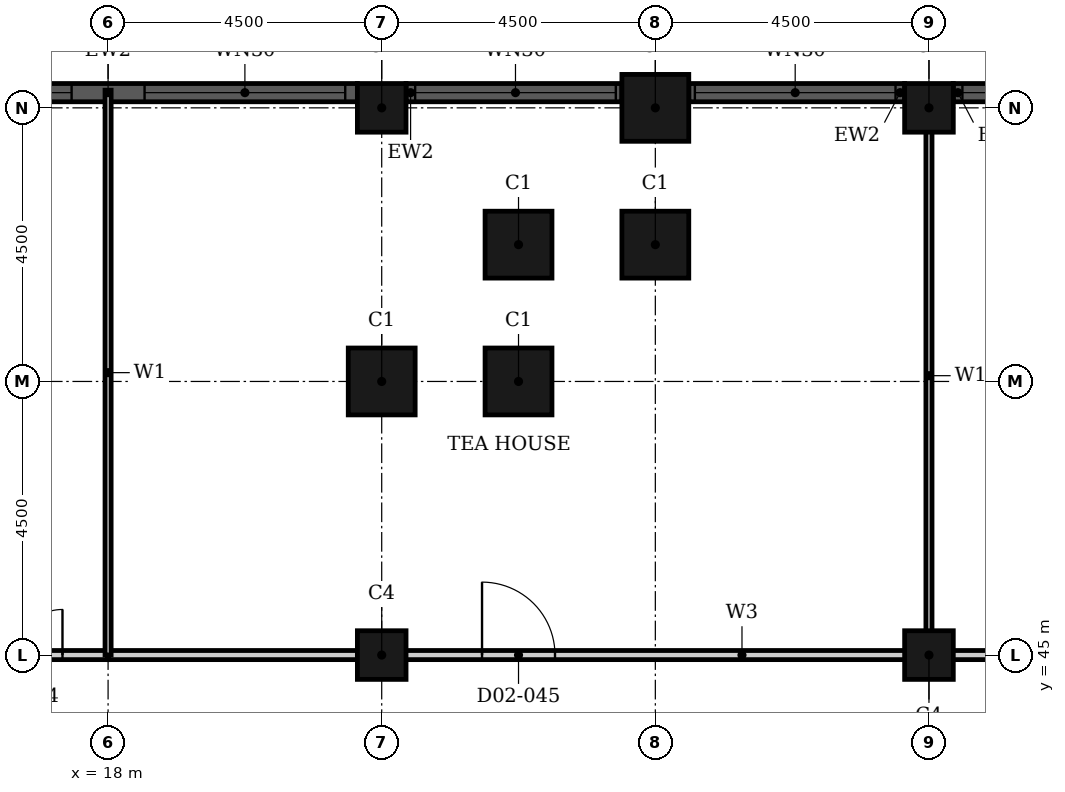
"""IFC4 building model, lengths in metres.
Left out: names, types, materials, properties, quantities, classifications, styles, units other than length and angle.
Written with IfcOpenShell. Run it as: python <this file> out.ifc"""

import sys

from ifc_helpers import new_model, si_unit, direction, frame, frame_2d, origin, origin_2d, place, context, subcontext, project, spatial, rectangle, hollow_rectangle, extrude, element, fill, save


model = new_model("IFC4")
c1 = context("Model", 3, precision=1e-05, world=origin(), true_north=direction((0.0, 1.0)))
c2 = subcontext(c1, "Body", "Model", "MODEL_VIEW")
j1 = project(units=[si_unit("LENGTHUNIT", "METRE"), si_unit("PLANEANGLEUNIT", "RADIAN")], contexts=[c1])
p1 = place(None, origin())
s1 = spatial("IfcSite", under=j1, at=p1, CompositionType="ELEMENT")
p2 = place(p1, origin())
s2 = spatial("IfcBuilding", under=s1, at=p2, CompositionType="ELEMENT")
p3 = place(p2, frame((0.0, 0.0, 12.0)))
s3 = spatial("IfcBuildingStorey", under=s2, at=p3, CompositionType="ELEMENT", Elevation=12.0)
for number, where, z_axis, x_axis in (
    (1, (27.0, 54.0, 0.0), (0.0, 0.0, 1.0), (1.0, 0.0, 0.0)),
    (2, (27.0, 51.75, 0.0), (0.0, 0.0, 1.0), (1.0, 0.0, 0.0)),
    (3, (24.75, 51.75, 0.0), (0.0, 0.0, 1.0), (1.0, 0.0, 0.0)),
    (4, (24.75, 49.5, 0.0), (0.0, 0.0, 1.0), (1.0, 0.0, 0.0)),
    (5, (22.5, 49.5, 0.0), (0.0, 0.0, 1.0), (1.0, 0.0, 0.0)),
):
    element("IfcColumn", number, at=place(p3, frame(where, z_axis=z_axis, x_axis=x_axis)), inside=s3, PredefinedType="COLUMN", context=c2, shape_type="SweptSolid", body=[
        extrude(hollow_rectangle(XDim=1.1, YDim=1.1, WallThickness=0.036, at=origin_2d()), origin(), (0.0, 0.0, 1.0), 5.4),
    ])
for number, where, z_axis, x_axis in (
    (6, (22.5, 54.0, 0.0), (0.0, 0.0, 1.0), (1.0, 0.0, 0.0)),
    (7, (31.5, 54.0, 0.0), (0.0, 0.0, 1.0), (1.0, 0.0, 0.0)),
    (8, (22.5, 45.0, 0.0), (0.0, 0.0, 1.0), (1.0, 0.0, 0.0)),
    (9, (31.5, 45.0, 0.0), (0.0, 0.0, 1.0), (1.0, 0.0, 0.0)),
):
    element("IfcColumn", number, at=place(p3, frame(where, z_axis=z_axis, x_axis=x_axis)), inside=s3, PredefinedType="COLUMN", context=c2, shape_type="SweptSolid", body=[
        extrude(hollow_rectangle(XDim=0.8, YDim=0.8, WallThickness=0.025, at=origin_2d()), origin(), (0.0, 0.0, 1.0), 5.4),
    ])
p4 = place(p3, frame((35.45, 54.25, 0.0), z_axis=(0.0, 0.0, 1.0), x_axis=(-1.0, 0.0, 0.0)))
e10 = element("IfcWall", 10, at=p4, inside=s3, PredefinedType="SOLIDWALL", context=c2, shape_type="SweptSolid", body=[
    extrude(rectangle(XDim=3.55, YDim=0.3, at=frame_2d((1.775, 0.0))), origin(), (0.0, 0.0, 1.0), 5.4),
])
p5 = place(p4, frame((0.1, 0.0, 0.9)))
e11 = element("IfcOpeningElement", 11, at=p5, cuts=e10, PredefinedType="OPENING", context=c2, shape_type="SweptSolid", body=[
    extrude(rectangle(XDim=3.3, YDim=3.5, at=frame_2d((1.65, 1.75))), frame((0.0, 0.16, 0.0), z_axis=(0.0, -1.0, 0.0), x_axis=(1.0, 0.0, 0.0)), (0.0, 0.0, 1.0), 0.32),
])
p6 = place(p3, frame((31.1, 54.25, 0.0), z_axis=(0.0, 0.0, 1.0), x_axis=(-1.0, 0.0, 0.0)))
e12 = element("IfcWall", 12, at=p6, inside=s3, PredefinedType="SOLIDWALL", context=c2, shape_type="SweptSolid", body=[
    extrude(rectangle(XDim=3.55, YDim=0.3, at=frame_2d((1.775, 0.0))), origin(), (0.0, 0.0, 1.0), 5.4),
])
p7 = place(p6, frame((0.15, 0.0, 0.9)))
e13 = element("IfcOpeningElement", 13, at=p7, cuts=e12, PredefinedType="OPENING", context=c2, shape_type="SweptSolid", body=[
    extrude(rectangle(XDim=3.3, YDim=3.5, at=frame_2d((1.65, 1.75))), frame((0.0, 0.16, 0.0), z_axis=(0.0, -1.0, 0.0), x_axis=(1.0, 0.0, 0.0)), (0.0, 0.0, 1.0), 0.32),
])
p8 = place(p3, frame((26.45, 54.25, 0.0), z_axis=(0.0, 0.0, 1.0), x_axis=(-1.0, 0.0, 0.0)))
e14 = element("IfcWall", 14, at=p8, inside=s3, PredefinedType="SOLIDWALL", context=c2, shape_type="SweptSolid", body=[
    extrude(rectangle(XDim=3.55, YDim=0.3, at=frame_2d((1.775, 0.0))), origin(), (0.0, 0.0, 1.0), 5.4),
])
p9 = place(p8, frame((0.1, 0.0, 0.9)))
e15 = element("IfcOpeningElement", 15, at=p9, cuts=e14, PredefinedType="OPENING", context=c2, shape_type="SweptSolid", body=[
    extrude(rectangle(XDim=3.3, YDim=3.5, at=frame_2d((1.65, 1.75))), frame((0.0, 0.16, 0.0), z_axis=(0.0, -1.0, 0.0), x_axis=(1.0, 0.0, 0.0)), (0.0, 0.0, 1.0), 0.32),
])
p10 = place(p3, frame((22.1, 54.25, 0.0), z_axis=(0.0, 0.0, 1.0), x_axis=(-1.0, 0.0, 0.0)))
e16 = element("IfcWall", 16, at=p10, inside=s3, PredefinedType="SOLIDWALL", context=c2, shape_type="SweptSolid", body=[
    extrude(rectangle(XDim=8.2, YDim=0.3, at=frame_2d((4.1, 0.0))), origin(), (0.0, 0.0, 1.0), 5.4),
])
p11 = place(p10, frame((0.2, 0.0, 0.9)))
e17 = element("IfcOpeningElement", 17, at=p11, cuts=e16, PredefinedType="OPENING", context=c2, shape_type="SweptSolid", body=[
    extrude(rectangle(XDim=3.3, YDim=3.5, at=frame_2d((1.65, 1.75))), frame((0.0, 0.16, 0.0), z_axis=(0.0, -1.0, 0.0), x_axis=(1.0, 0.0, 0.0)), (0.0, 0.0, 1.0), 0.32),
])
p12 = place(p10, frame((4.7, 0.0, 0.9)))
e18 = element("IfcOpeningElement", 18, at=p12, cuts=e16, PredefinedType="OPENING", context=c2, shape_type="SweptSolid", body=[
    extrude(rectangle(XDim=3.3, YDim=3.5, at=frame_2d((1.65, 1.75))), frame((0.0, 0.16, 0.0), z_axis=(0.0, -1.0, 0.0), x_axis=(1.0, 0.0, 0.0)), (0.0, 0.0, 1.0), 0.32),
])
p13 = place(p3, frame((15.0, 45.0, 0.0), z_axis=(0.0, 0.0, 1.0), x_axis=(1.0, 0.0, 0.0)))
e19 = element("IfcWall", 19, at=p13, inside=s3, PredefinedType="PARTITIONING", context=c2, shape_type="SweptSolid", body=[
    extrude(rectangle(XDim=3.0, YDim=0.15, at=frame_2d((1.5, 0.0))), origin(), (0.0, 0.0, 1.0), 5.05),
])
p14 = place(p13, frame((0.75, 0.0, 0.0)))
e20 = element("IfcOpeningElement", 20, at=p14, cuts=e19, PredefinedType="OPENING", context=c2, shape_type="SweptSolid", body=[
    extrude(rectangle(XDim=1.5, YDim=2.4, at=frame_2d((0.75, 1.2))), frame((0.0, 0.085, 0.0), z_axis=(0.0, -1.0, 0.0), x_axis=(1.0, 0.0, 0.0)), (0.0, 0.0, 1.0), 0.17),
])
p15 = place(p3, frame((18.0, 45.0, 0.0), z_axis=(0.0, 0.0, 1.0), x_axis=(1.0, 0.0, 0.0)))
e21 = element("IfcWall", 21, at=p15, inside=s3, PredefinedType="PARTITIONING", context=c2, shape_type="SweptSolid", body=[
    extrude(rectangle(XDim=13.5, YDim=0.15, at=frame_2d((6.75, 0.0))), origin(), (0.0, 0.0, 1.0), 5.05),
])
p16 = place(p15, frame((6.15, 0.0, 0.0)))
e22 = element("IfcOpeningElement", 22, at=p16, cuts=e21, PredefinedType="OPENING", context=c2, shape_type="SweptSolid", body=[
    extrude(rectangle(XDim=1.2, YDim=2.4, at=frame_2d((0.6, 1.2))), frame((0.0, 0.085, 0.0), z_axis=(0.0, -1.0, 0.0), x_axis=(1.0, 0.0, 0.0)), (0.0, 0.0, 1.0), 0.17),
])
p17 = place(p3, frame((31.5, 45.0, 0.0), z_axis=(0.0, 0.0, 1.0), x_axis=(1.0, 0.0, 0.0)))
e23 = element("IfcWall", 23, at=p17, inside=s3, PredefinedType="PARTITIONING", context=c2, shape_type="SweptSolid", body=[
    extrude(rectangle(XDim=6.75, YDim=0.15, at=frame_2d((3.375, 0.0))), origin(), (0.0, 0.0, 1.0), 5.05),
])
p18 = place(p17, frame((2.625, 0.0, 0.0)))
e24 = element("IfcOpeningElement", 24, at=p18, cuts=e23, PredefinedType="OPENING", context=c2, shape_type="SweptSolid", body=[
    extrude(rectangle(XDim=1.5, YDim=2.4, at=frame_2d((0.75, 1.2))), frame((0.0, 0.085, 0.0), z_axis=(0.0, -1.0, 0.0), x_axis=(1.0, 0.0, 0.0)), (0.0, 0.0, 1.0), 0.17),
])
p19 = place(p3, frame((18.0, 45.0, 0.0), z_axis=(0.0, 0.0, 1.0), x_axis=(0.0, 1.0, 0.0)))
e25 = element("IfcWall", 25, at=p19, inside=s3, PredefinedType="PARTITIONING", context=c2, shape_type="SweptSolid", body=[
    extrude(rectangle(XDim=9.29, YDim=0.1, at=frame_2d((4.645, 0.0))), origin(), (0.0, 0.0, 1.0), 5.05),
])
p20 = place(p3, frame((31.5, 45.0, 0.0), z_axis=(0.0, 0.0, 1.0), x_axis=(0.0, 1.0, 0.0)))
e26 = element("IfcWall", 26, at=p20, inside=s3, PredefinedType="PARTITIONING", context=c2, shape_type="SweptSolid", body=[
    extrude(rectangle(XDim=9.19, YDim=0.1, at=frame_2d((4.595, 0.0))), origin(), (0.0, 0.0, 1.0), 5.05),
])
p21 = place(p5, origin())
e27 = element("IfcWindow", 27, at=p21, inside=s3, PartitioningType="SINGLE_PANEL", PredefinedType="WINDOW", context=c2, shape_type="SweptSolid", body=[
    extrude(rectangle(XDim=3.3, YDim=3.5, at=frame_2d((1.65, 1.75))), frame((0.0, 0.03, 0.0), z_axis=(0.0, -1.0, 0.0), x_axis=(1.0, 0.0, 0.0)), (0.0, 0.0, 1.0), 0.06),
])
fill(e11, e27)
p22 = place(p7, origin())
e28 = element("IfcWindow", 28, at=p22, inside=s3, PartitioningType="SINGLE_PANEL", PredefinedType="WINDOW", context=c2, shape_type="SweptSolid", body=[
    extrude(rectangle(XDim=3.3, YDim=3.5, at=frame_2d((1.65, 1.75))), frame((0.0, 0.03, 0.0), z_axis=(0.0, -1.0, 0.0), x_axis=(1.0, 0.0, 0.0)), (0.0, 0.0, 1.0), 0.06),
])
fill(e13, e28)
p23 = place(p9, origin())
e29 = element("IfcWindow", 29, at=p23, inside=s3, PartitioningType="SINGLE_PANEL", PredefinedType="WINDOW", context=c2, shape_type="SweptSolid", body=[
    extrude(rectangle(XDim=3.3, YDim=3.5, at=frame_2d((1.65, 1.75))), frame((0.0, 0.03, 0.0), z_axis=(0.0, -1.0, 0.0), x_axis=(1.0, 0.0, 0.0)), (0.0, 0.0, 1.0), 0.06),
])
fill(e15, e29)
p24 = place(p11, origin())
e30 = element("IfcWindow", 30, at=p24, inside=s3, PartitioningType="SINGLE_PANEL", PredefinedType="WINDOW", context=c2, shape_type="SweptSolid", body=[
    extrude(rectangle(XDim=3.3, YDim=3.5, at=frame_2d((1.65, 1.75))), frame((0.0, 0.03, 0.0), z_axis=(0.0, -1.0, 0.0), x_axis=(1.0, 0.0, 0.0)), (0.0, 0.0, 1.0), 0.06),
])
fill(e17, e30)
p25 = place(p12, origin())
e31 = element("IfcWindow", 31, at=p25, inside=s3, PartitioningType="SINGLE_PANEL", PredefinedType="WINDOW", context=c2, shape_type="SweptSolid", body=[
    extrude(rectangle(XDim=3.3, YDim=3.5, at=frame_2d((1.65, 1.75))), frame((0.0, 0.03, 0.0), z_axis=(0.0, -1.0, 0.0), x_axis=(1.0, 0.0, 0.0)), (0.0, 0.0, 1.0), 0.06),
])
fill(e18, e31)
p26 = place(p14, origin())
e32 = element("IfcDoor", 32, at=p26, inside=s3, OperationType="DOUBLE_DOOR_SINGLE_SWING", PredefinedType="DOOR", context=c2, shape_type="SweptSolid", body=[
    extrude(rectangle(XDim=1.5, YDim=2.4, at=frame_2d((0.75, 1.2))), frame((0.0, 0.025, 0.0), z_axis=(0.0, -1.0, 0.0), x_axis=(1.0, 0.0, 0.0)), (0.0, 0.0, 1.0), 0.05),
])
fill(e20, e32)
p27 = place(p16, origin())
e33 = element("IfcDoor", 33, at=p27, inside=s3, OperationType="SINGLE_SWING_RIGHT", PredefinedType="DOOR", context=c2, shape_type="SweptSolid", body=[
    extrude(rectangle(XDim=1.2, YDim=2.4, at=frame_2d((0.6, 1.2))), frame((0.0, 0.025, 0.0), z_axis=(0.0, -1.0, 0.0), x_axis=(1.0, 0.0, 0.0)), (0.0, 0.0, 1.0), 0.05),
])
fill(e22, e33)
save(model, sys.argv[1])
